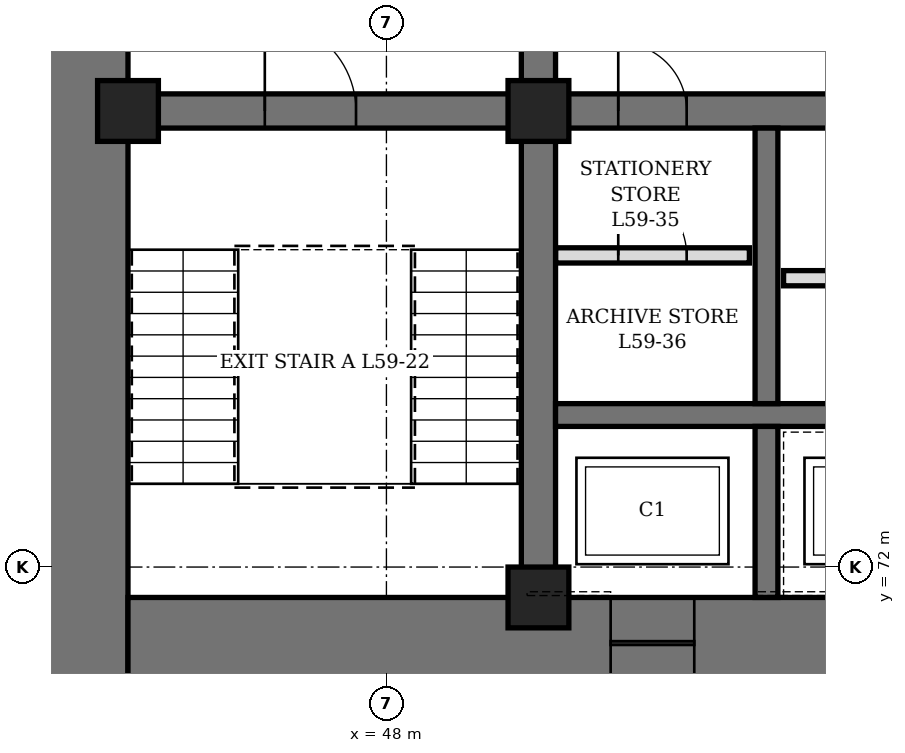
"""IFC4 building model, lengths in metres.
Left out: names, types, materials, properties, quantities, classifications, styles, units other than length and angle.
Written with IfcOpenShell. Run it as: python <this file> out.ifc"""

import sys

from ifc_helpers import new_model, si_unit, direction, frame, frame_2d, origin, origin_2d, place, context, subcontext, project, spatial, rectangle, hollow_rectangle, extrude, element, fill, save


model = new_model("IFC4")
c1 = context("Model", 3, precision=1e-05, world=origin(), true_north=direction((0.0, 1.0)))
c2 = subcontext(c1, "Body", "Model", "MODEL_VIEW")
j1 = project(units=[si_unit("LENGTHUNIT", "METRE"), si_unit("PLANEANGLEUNIT", "RADIAN")], contexts=[c1])
p1 = place(None, origin())
s1 = spatial("IfcSite", under=j1, at=p1, CompositionType="ELEMENT")
p2 = place(p1, origin())
s2 = spatial("IfcBuilding", under=s1, at=p2, CompositionType="ELEMENT")
p3 = place(p2, frame((0.0, 0.0, 262.9)))
s3 = spatial("IfcBuildingStorey", under=s2, at=p3, CompositionType="ELEMENT", Elevation=262.9)
p4 = place(p3, frame((44.0, 70.4, 0.0), z_axis=(0.0, 0.0, 1.0), x_axis=(0.0, 1.0, 0.0)))
e1 = element("IfcWall", 1, at=p4, inside=s3, PredefinedType="SHEAR", context=c2, shape_type="SweptSolid", body=[
    extrude(rectangle(XDim=19.2, YDim=1.2, at=frame_2d((9.6, 0.0))), origin(), (0.0, 0.0, 1.0), 4.2),
])
p5 = place(p4, frame((8.6, 0.0, 0.0)))
e2 = element("IfcOpeningElement", 2, at=p5, cuts=e1, PredefinedType="OPENING", context=c2, shape_type="SweptSolid", body=[
    extrude(rectangle(XDim=2.0, YDim=2.4, at=frame_2d((1.0, 1.2))), frame((0.0, 0.61, 0.0), z_axis=(0.0, -1.0, 0.0), x_axis=(1.0, 0.0, 0.0)), (0.0, 0.0, 1.0), 1.22),
])
p6 = place(p3, frame((44.6, 71.0, 0.0), z_axis=(0.0, 0.0, 1.0), x_axis=(1.0, 0.0, 0.0)))
e3 = element("IfcWall", 3, at=p6, inside=s3, PredefinedType="SHEAR", context=c2, shape_type="SweptSolid", body=[
    extrude(rectangle(XDim=22.8, YDim=1.2, at=frame_2d((11.4, 0.0))), origin(), (0.0, 0.0, 1.0), 4.2),
])
p7 = place(p6, frame((6.35, 0.0, 0.0)))
e4 = element("IfcOpeningElement", 4, at=p7, cuts=e3, PredefinedType="OPENING", context=c2, shape_type="SweptSolid", body=[
    extrude(rectangle(XDim=1.1, YDim=2.2, at=frame_2d((0.55, 1.1))), frame((0.0, 0.61, 0.0), z_axis=(0.0, -1.0, 0.0), x_axis=(1.0, 0.0, 0.0)), (0.0, 0.0, 1.0), 1.22),
])
p8 = place(p6, frame((9.35, 0.0, 0.0)))
e5 = element("IfcOpeningElement", 5, at=p8, cuts=e3, PredefinedType="OPENING", context=c2, shape_type="SweptSolid", body=[
    extrude(rectangle(XDim=1.1, YDim=2.2, at=frame_2d((0.55, 1.1))), frame((0.0, 0.61, 0.0), z_axis=(0.0, -1.0, 0.0), x_axis=(1.0, 0.0, 0.0)), (0.0, 0.0, 1.0), 1.22),
])
p9 = place(p6, frame((12.35, 0.0, 0.0)))
e6 = element("IfcOpeningElement", 6, at=p9, cuts=e3, PredefinedType="OPENING", context=c2, shape_type="SweptSolid", body=[
    extrude(rectangle(XDim=1.1, YDim=2.2, at=frame_2d((0.55, 1.1))), frame((0.0, 0.61, 0.0), z_axis=(0.0, -1.0, 0.0), x_axis=(1.0, 0.0, 0.0)), (0.0, 0.0, 1.0), 1.22),
])
p10 = place(p6, frame((15.35, 0.0, 0.0)))
e7 = element("IfcOpeningElement", 7, at=p10, cuts=e3, PredefinedType="OPENING", context=c2, shape_type="SweptSolid", body=[
    extrude(rectangle(XDim=1.1, YDim=2.2, at=frame_2d((0.55, 1.1))), frame((0.0, 0.61, 0.0), z_axis=(0.0, -1.0, 0.0), x_axis=(1.0, 0.0, 0.0)), (0.0, 0.0, 1.0), 1.22),
])
p11 = place(p3, frame((50.0, 71.6, 0.0), z_axis=(0.0, 0.0, 1.0), x_axis=(0.0, 1.0, 0.0)))
e8 = element("IfcWall", 8, at=p11, inside=s3, PredefinedType="SHEAR", context=c2, shape_type="SweptSolid", body=[
    extrude(rectangle(XDim=16.8, YDim=0.45, at=frame_2d((8.4, 0.0))), origin(), (0.0, 0.0, 1.0), 4.2),
])
p12 = place(p11, frame((7.5, 0.0, 0.0)))
e9 = element("IfcOpeningElement", 9, at=p12, cuts=e8, PredefinedType="OPENING", context=c2, shape_type="SweptSolid", body=[
    extrude(rectangle(XDim=1.8, YDim=2.4, at=frame_2d((0.9, 1.2))), frame((0.0, 0.235, 0.0), z_axis=(0.0, -1.0, 0.0), x_axis=(1.0, 0.0, 0.0)), (0.0, 0.0, 1.0), 0.47),
])
p13 = place(p3, frame((44.6, 78.0, 0.0), z_axis=(0.0, 0.0, 1.0), x_axis=(1.0, 0.0, 0.0)))
e10 = element("IfcWall", 10, at=p13, inside=s3, PredefinedType="SHEAR", context=c2, shape_type="SweptSolid", body=[
    extrude(rectangle(XDim=5.175, YDim=0.45, at=frame_2d((2.587, 0.0))), origin(), (0.0, 0.0, 1.0), 4.2),
])
p14 = place(p13, frame((1.8, 0.0, 0.0)))
e11 = element("IfcOpeningElement", 11, at=p14, cuts=e10, PredefinedType="OPENING", context=c2, shape_type="SweptSolid", body=[
    extrude(rectangle(XDim=1.2, YDim=2.1, at=frame_2d((0.6, 1.05))), frame((0.0, 0.235, 0.0), z_axis=(0.0, -1.0, 0.0), x_axis=(1.0, 0.0, 0.0)), (0.0, 0.0, 1.0), 0.47),
])
p15 = place(p3, frame((50.225, 78.0, 0.0), z_axis=(0.0, 0.0, 1.0), x_axis=(1.0, 0.0, 0.0)))
e12 = element("IfcWall", 12, at=p15, inside=s3, PredefinedType="SHEAR", context=c2, shape_type="SweptSolid", body=[
    extrude(rectangle(XDim=11.55, YDim=0.45, at=frame_2d((5.775, 0.0))), origin(), (0.0, 0.0, 1.0), 4.2),
])
p16 = place(p15, frame((0.825, 0.0, 0.0)))
e13 = element("IfcOpeningElement", 13, at=p16, cuts=e12, PredefinedType="OPENING", context=c2, shape_type="SweptSolid", body=[
    extrude(rectangle(XDim=0.9, YDim=2.1, at=frame_2d((0.45, 1.05))), frame((0.0, 0.235, 0.0), z_axis=(0.0, -1.0, 0.0), x_axis=(1.0, 0.0, 0.0)), (0.0, 0.0, 1.0), 0.47),
])
p17 = place(p15, frame((3.825, 0.0, 0.0)))
e14 = element("IfcOpeningElement", 14, at=p17, cuts=e12, PredefinedType="OPENING", context=c2, shape_type="SweptSolid", body=[
    extrude(rectangle(XDim=0.9, YDim=2.1, at=frame_2d((0.45, 1.05))), frame((0.0, 0.235, 0.0), z_axis=(0.0, -1.0, 0.0), x_axis=(1.0, 0.0, 0.0)), (0.0, 0.0, 1.0), 0.47),
])
p18 = place(p15, frame((6.825, 0.0, 0.0)))
e15 = element("IfcOpeningElement", 15, at=p18, cuts=e12, PredefinedType="OPENING", context=c2, shape_type="SweptSolid", body=[
    extrude(rectangle(XDim=0.9, YDim=2.1, at=frame_2d((0.45, 1.05))), frame((0.0, 0.235, 0.0), z_axis=(0.0, -1.0, 0.0), x_axis=(1.0, 0.0, 0.0)), (0.0, 0.0, 1.0), 0.47),
])
p19 = place(p15, frame((9.825, 0.0, 0.0)))
e16 = element("IfcOpeningElement", 16, at=p19, cuts=e12, PredefinedType="OPENING", context=c2, shape_type="SweptSolid", body=[
    extrude(rectangle(XDim=0.9, YDim=2.1, at=frame_2d((0.45, 1.05))), frame((0.0, 0.235, 0.0), z_axis=(0.0, -1.0, 0.0), x_axis=(1.0, 0.0, 0.0)), (0.0, 0.0, 1.0), 0.47),
])
p20 = place(p3, frame((50.225, 74.0, 0.0), z_axis=(0.0, 0.0, 1.0), x_axis=(1.0, 0.0, 0.0)))
e17 = element("IfcWall", 17, at=p20, inside=s3, PredefinedType="SHEAR", context=c2, shape_type="SweptSolid", body=[
    extrude(rectangle(XDim=11.55, YDim=0.3, at=frame_2d((5.775, 0.0))), origin(), (0.0, 0.0, 1.0), 4.2),
])
p21 = place(p3, frame((53.0, 71.6, 0.0), z_axis=(0.0, 0.0, 1.0), x_axis=(0.0, 1.0, 0.0)))
e18 = element("IfcWall", 18, at=p21, inside=s3, PredefinedType="SHEAR", context=c2, shape_type="SweptSolid", body=[
    extrude(rectangle(XDim=2.25, YDim=0.3, at=frame_2d((1.125, 0.0))), origin(), (0.0, 0.0, 1.0), 4.2),
])
p22 = place(p3, frame((53.0, 74.15, 0.0), z_axis=(0.0, 0.0, 1.0), x_axis=(0.0, 1.0, 0.0)))
e19 = element("IfcWall", 19, at=p22, inside=s3, PredefinedType="SHEAR", context=c2, shape_type="SweptSolid", body=[
    extrude(rectangle(XDim=3.625, YDim=0.3, at=frame_2d((1.812, 0.0))), origin(), (0.0, 0.0, 1.0), 4.2),
])
for number, where, z_axis, x_axis in (
    (20, (44.6, 78.0, 0.0), (0.0, 0.0, 1.0), (1.0, 0.0, 0.0)),
    (21, (50.0, 71.6, 0.0), (0.0, 0.0, 1.0), (1.0, 0.0, 0.0)),
    (22, (50.0, 78.0, 0.0), (0.0, 0.0, 1.0), (1.0, 0.0, 0.0)),
):
    element("IfcColumn", number, at=place(p3, frame(where, z_axis=z_axis, x_axis=x_axis)), inside=s3, PredefinedType="COLUMN", context=c2, shape_type="SweptSolid", body=[
        extrude(hollow_rectangle(XDim=0.8, YDim=0.8, WallThickness=0.1, at=origin_2d()), origin(), (0.0, 0.0, 1.0), 4.2),
    ])
p23 = place(p3, frame((50.225, 76.1, 0.0), z_axis=(0.0, 0.0, 1.0), x_axis=(1.0, 0.0, 0.0)))
e23 = element("IfcWall", 23, at=p23, inside=s3, PredefinedType="PARTITIONING", context=c2, shape_type="SweptSolid", body=[
    extrude(rectangle(XDim=2.55, YDim=0.2, at=frame_2d((1.275, 0.0))), origin(), (0.0, 0.0, 1.0), 4.04),
])
p24 = place(p23, frame((0.825, 0.0, 0.0)))
e24 = element("IfcOpeningElement", 24, at=p24, cuts=e23, PredefinedType="OPENING", context=c2, shape_type="SweptSolid", body=[
    extrude(rectangle(XDim=0.9, YDim=2.1, at=frame_2d((0.45, 1.05))), frame((0.0, 0.11, 0.0), z_axis=(0.0, -1.0, 0.0), x_axis=(1.0, 0.0, 0.0)), (0.0, 0.0, 1.0), 0.22),
])
p25 = place(p3, frame((53.225, 75.8, 0.0), z_axis=(0.0, 0.0, 1.0), x_axis=(1.0, 0.0, 0.0)))
e25 = element("IfcWall", 25, at=p25, inside=s3, PredefinedType="PARTITIONING", context=c2, shape_type="SweptSolid", body=[
    extrude(rectangle(XDim=2.55, YDim=0.2, at=frame_2d((1.275, 0.0))), origin(), (0.0, 0.0, 1.0), 4.04),
])
p26 = place(p25, frame((0.825, 0.0, 0.0)))
e26 = element("IfcOpeningElement", 26, at=p26, cuts=e25, PredefinedType="OPENING", context=c2, shape_type="SweptSolid", body=[
    extrude(rectangle(XDim=0.9, YDim=2.1, at=frame_2d((0.45, 1.05))), frame((0.0, 0.11, 0.0), z_axis=(0.0, -1.0, 0.0), x_axis=(1.0, 0.0, 0.0)), (0.0, 0.0, 1.0), 0.22),
])
p27 = place(p16, origin())
e27 = element("IfcDoor", 27, at=p27, inside=s3, OperationType="SINGLE_SWING_LEFT", PredefinedType="DOOR", context=c2, shape_type="SweptSolid", body=[
    extrude(rectangle(XDim=0.9, YDim=2.1, at=frame_2d((0.45, 1.05))), frame((0.0, 0.225, 0.0), z_axis=(0.0, -1.0, 0.0), x_axis=(1.0, 0.0, 0.0)), (0.0, 0.0, 1.0), 0.449),
])
fill(e13, e27)
p28 = place(p24, origin())
e28 = element("IfcDoor", 28, at=p28, inside=s3, OperationType="SINGLE_SWING_LEFT", PredefinedType="DOOR", context=c2, shape_type="SweptSolid", body=[
    extrude(rectangle(XDim=0.9, YDim=2.1, at=frame_2d((0.45, 1.05))), frame((0.0, 0.1, 0.0), z_axis=(0.0, -1.0, 0.0), x_axis=(1.0, 0.0, 0.0)), (0.0, 0.0, 1.0), 0.199),
])
fill(e24, e28)
p29 = place(p14, origin())
e29 = element("IfcDoor", 29, at=p29, inside=s3, OperationType="SINGLE_SWING_LEFT", PredefinedType="DOOR", context=c2, shape_type="SweptSolid", body=[
    extrude(rectangle(XDim=1.2, YDim=2.1, at=frame_2d((0.6, 1.05))), frame((0.0, 0.225, 0.0), z_axis=(0.0, -1.0, 0.0), x_axis=(1.0, 0.0, 0.0)), (0.0, 0.0, 1.0), 0.449),
])
fill(e11, e29)
p30 = place(p7, origin())
e30 = element("IfcDoor", 30, at=p30, inside=s3, OperationType="SLIDING_TO_LEFT", PredefinedType="DOOR", context=c2, shape_type="SweptSolid", body=[
    extrude(rectangle(XDim=1.1, YDim=2.2, at=frame_2d((0.55, 1.1))), frame((0.0, 0.35, 0.0), z_axis=(0.0, -1.0, 0.0), x_axis=(1.0, 0.0, 0.0)), (0.0, 0.0, 1.0), 0.7),
])
fill(e4, e30)
save(model, sys.argv[1])
